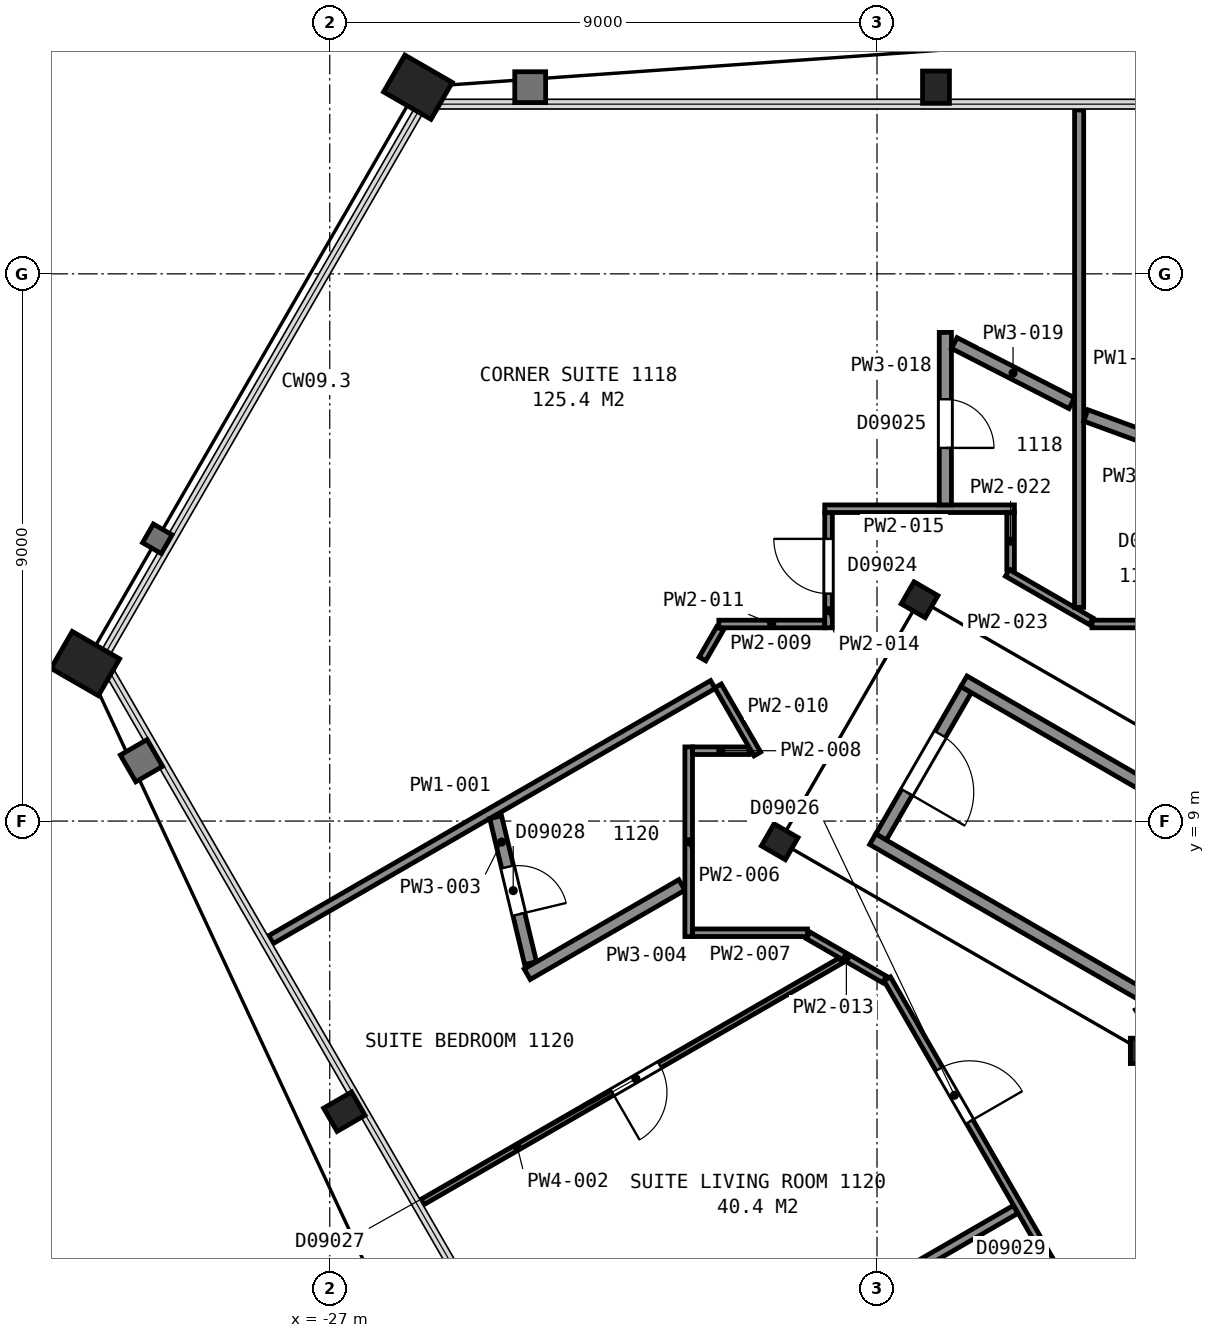
"""IFC4 building model, lengths in metres.
Left out: names, types, materials, properties, quantities, classifications, styles, units other than length and angle.
Written with IfcOpenShell. Run it as: python <this file> out.ifc"""

import sys

from ifc_helpers import new_model, si_unit, direction, frame, frame_2d, origin, origin_2d, place, context, subcontext, project, spatial, rectangle, hollow_rectangle, i_section, extrude, element, fill, save


model = new_model("IFC4")
c1 = context("Model", 3, precision=1e-05, world=origin(), true_north=direction((0.0, 1.0)))
c2 = subcontext(c1, "Body", "Model", "MODEL_VIEW")
j1 = project(units=[si_unit("LENGTHUNIT", "METRE"), si_unit("PLANEANGLEUNIT", "RADIAN")], contexts=[c1])
p1 = place(None, origin())
s1 = spatial("IfcSite", under=j1, at=p1, CompositionType="ELEMENT")
p2 = place(p1, origin())
s2 = spatial("IfcBuilding", under=s1, at=p2, CompositionType="ELEMENT")
p3 = place(p2, frame((0.0, 0.0, 54.8)))
s3 = spatial("IfcBuildingStorey", under=s2, at=p3, CompositionType="ELEMENT", Elevation=54.8)
p4 = place(p3, frame((-17.03, 21.07, 0.0), z_axis=(0.0, 0.0, 1.0), x_axis=(1.0, 0.0, 0.0)))
e1 = element("IfcColumn", 1, at=p4, inside=s3, PredefinedType="COLUMN", context=c2, shape_type="SweptSolid", body=[
    extrude(i_section(OverallWidth=0.442, OverallDepth=0.531, WebThickness=0.066, FlangeThickness=0.106, FilletRadius=0.015, at=origin_2d()), origin(), (0.0, 0.0, 1.0), 3.6),
])
for number, where, z_axis, x_axis in (
    (2, (-25.55, 21.07, 0.0), (0.0, 0.0, 1.0), (0.5, 0.866, 0.0)),
    (3, (-31.02, 11.59, 0.0), (0.0, 0.0, 1.0), (0.5, 0.866, 0.0)),
):
    element("IfcColumn", number, at=place(p3, frame(where, z_axis=z_axis, x_axis=x_axis)), inside=s3, PredefinedType="COLUMN", context=c2, shape_type="SweptSolid", body=[
        extrude(hollow_rectangle(XDim=0.7, YDim=0.9, WallThickness=0.065, at=origin_2d()), origin(), (0.0, 0.0, 1.0), 3.6),
    ])
p5 = place(p3, frame((-26.76, 4.22, 0.0), z_axis=(0.0, 0.0, 1.0), x_axis=(-0.5, 0.866025403784, 0.0)))
e4 = element("IfcColumn", 4, at=p5, inside=s3, PredefinedType="COLUMN", context=c2, shape_type="SweptSolid", body=[
    extrude(i_section(OverallWidth=0.442, OverallDepth=0.531, WebThickness=0.066, FlangeThickness=0.106, FilletRadius=0.015, at=origin_2d()), origin(), (0.0, 0.0, 1.0), 3.6),
])
for number, where, z_axis, x_axis in (
    (5, (-17.3, 12.64, 0.0), (0.0, 0.0, 1.0), (0.5, 0.866, 0.0)),
    (6, (-19.6, 8.66, 0.0), (0.0, 0.0, 1.0), (0.5, 0.866, 0.0)),
):
    element("IfcColumn", number, at=place(p3, frame(where, z_axis=z_axis, x_axis=x_axis)), inside=s3, PredefinedType="COLUMN", context=c2, shape_type="SweptSolid", body=[
        extrude(i_section(OverallWidth=0.419, OverallDepth=0.455, WebThickness=0.042, FlangeThickness=0.068, FilletRadius=0.015, at=origin_2d()), origin(), (0.0, 0.0, 1.0), 3.6),
    ])
p6 = place(p3, frame((-13.63, 5.22, 0.0), z_axis=(0.0, 0.0, 1.0), x_axis=(1.0, 0.0, 0.0)))
e7 = element("IfcColumn", 7, at=p6, inside=s3, PredefinedType="COLUMN", context=c2, shape_type="SweptSolid", body=[
    extrude(i_section(OverallWidth=0.406, OverallDepth=0.417, WebThickness=0.03, FlangeThickness=0.048, FilletRadius=0.015, at=origin_2d()), origin(), (0.0, 0.0, 1.0), 3.6),
])
p7 = place(p3, frame((-16.534, 11.162, 0.0), z_axis=(0.0, 0.0, 1.0), x_axis=(-0.49998411664, -0.866034573852, 0.0)))
e8 = element("IfcWall", 8, at=p7, inside=s3, PredefinedType="PARTITIONING", context=c2, shape_type="SweptSolid", body=[
    extrude(rectangle(XDim=2.8, YDim=0.2, at=frame_2d((1.4, 0.0))), origin(), (0.0, 0.0, 1.0), 3.35),
])
p8 = place(p7, frame((0.85, 0.0, 0.0)))
e9 = element("IfcOpeningElement", 9, at=p8, cuts=e8, PredefinedType="OPENING", context=c2, shape_type="SweptSolid", body=[
    extrude(rectangle(XDim=1.1, YDim=2.1, at=frame_2d((0.55, 1.05))), frame((0.0, 0.11, 0.0), z_axis=(0.0, -1.0, 0.0), x_axis=(1.0, 0.0, 0.0)), (0.0, 0.0, 1.0), 0.22),
])
for number, where, z_axis, x_axis in (
    (10, (-7.678, 2.701, 0.0), (0.0, 0.0, 1.0), (-0.866, 0.5, 0.0)),
    (11, (-6.178, 5.299, 0.0), (0.0, 0.0, 1.0), (-0.866, 0.5, 0.0)),
):
    element("IfcWall", number, at=place(p3, frame(where, z_axis=z_axis, x_axis=x_axis)), inside=s3, PredefinedType="PARTITIONING", context=c2, shape_type="SweptSolid", body=[
        extrude(rectangle(XDim=12.0, YDim=0.2, at=frame_2d((6.0, 0.0))), origin(), (0.0, 0.0, 1.0), 3.35),
    ])
p9 = place(p3, frame((-27.967, 7.05, 0.0), z_axis=(0.0, 0.0, 1.0), x_axis=(0.86603249375, 0.499987719618, 0.0)))
e12 = element("IfcWall", 12, at=p9, inside=s3, PredefinedType="PARTITIONING", context=c2, shape_type="SweptSolid", body=[
    extrude(rectangle(XDim=8.392, YDim=0.15, at=frame_2d((4.196, 0.0))), origin(), (0.0, 0.0, 1.0), 2.613),
])
p10 = place(p3, frame((-25.476, 2.735, 0.0), z_axis=(0.0, 0.0, 1.0), x_axis=(0.866077639848, 0.499909513568, 0.0)))
e13 = element("IfcWall", 13, at=p10, inside=s3, PredefinedType="PARTITIONING", context=c2, shape_type="SweptSolid", body=[
    extrude(rectangle(XDim=7.946, YDim=0.1, at=frame_2d((3.973, 0.0))), origin(), (0.0, 0.0, 1.0), 2.613),
])
p11 = place(p10, frame((3.604, 0.0, 0.0)))
e14 = element("IfcOpeningElement", 14, at=p11, cuts=e13, PredefinedType="OPENING", context=c2, shape_type="SweptSolid", body=[
    extrude(rectangle(XDim=0.9, YDim=2.1, at=frame_2d((0.45, 1.05))), frame((0.0, 0.06, 0.0), z_axis=(0.0, -1.0, 0.0), x_axis=(1.0, 0.0, 0.0)), (0.0, 0.0, 1.0), 0.12),
])
p12 = place(p3, frame((-24.272, 9.064, 0.0), z_axis=(0.0, 0.0, 1.0), x_axis=(0.232636237171, -0.972563818551, 0.0)))
e15 = element("IfcWall", 15, at=p12, inside=s3, PredefinedType="PARTITIONING", context=c2, shape_type="SweptSolid", body=[
    extrude(rectangle(XDim=2.469, YDim=0.2, at=frame_2d((1.235, 0.0))), origin(), (0.0, 0.0, 1.0), 2.613),
])
p13 = place(p12, frame((0.842, 0.0, 0.0)))
e16 = element("IfcOpeningElement", 16, at=p13, cuts=e15, PredefinedType="OPENING", context=c2, shape_type="SweptSolid", body=[
    extrude(rectangle(XDim=0.8, YDim=2.1, at=frame_2d((0.4, 1.05))), frame((0.0, 0.11, 0.0), z_axis=(0.0, -1.0, 0.0), x_axis=(1.0, 0.0, 0.0)), (0.0, 0.0, 1.0), 0.22),
])
p14 = place(p3, frame((-23.753, 6.481, 0.0), z_axis=(0.0, 0.0, 1.0), x_axis=(0.866070680301, 0.499921570572, 0.0)))
e17 = element("IfcWall", 17, at=p14, inside=s3, PredefinedType="PARTITIONING", context=c2, shape_type="SweptSolid", body=[
    extrude(rectangle(XDim=2.937, YDim=0.2, at=frame_2d((1.468, 0.0))), origin(), (0.0, 0.0, 1.0), 2.613),
])
p15 = place(p3, frame((-22.984, -1.581, 0.0), z_axis=(0.0, 0.0, 1.0), x_axis=(0.866040157966, 0.499974444137, 0.0)))
e18 = element("IfcWall", 18, at=p15, inside=s3, PredefinedType="PARTITIONING", context=c2, shape_type="SweptSolid", body=[
    extrude(rectangle(XDim=8.387, YDim=0.15, at=frame_2d((4.193, 0.0))), origin(), (0.0, 0.0, 1.0), 2.613),
])
p16 = place(p3, frame((-21.097, 7.101, 0.0), z_axis=(0.0, 0.0, 1.0), x_axis=(0.0, 1.0, 0.0)))
e19 = element("IfcWall", 19, at=p16, inside=s3, PredefinedType="PARTITIONING", context=c2, shape_type="SweptSolid", body=[
    extrude(rectangle(XDim=3.119, YDim=0.125, at=frame_2d((1.56, 0.0))), origin(), (0.0, 0.0, 1.0), 2.613),
])
p17 = place(p3, frame((-21.032, 7.163, 0.0), z_axis=(0.0, 0.0, 1.0), x_axis=(1.0, 0.0, 0.0)))
e20 = element("IfcWall", 20, at=p17, inside=s3, PredefinedType="PARTITIONING", context=c2, shape_type="SweptSolid", body=[
    extrude(rectangle(XDim=1.888, YDim=0.125, at=frame_2d((0.944, 0.0))), origin(), (0.0, 0.0, 1.0), 2.613),
])
p18 = place(p3, frame((-21.032, 10.157, 0.0), z_axis=(0.0, 0.0, 1.0), x_axis=(1.0, 0.0, 0.0)))
e21 = element("IfcWall", 21, at=p18, inside=s3, PredefinedType="PARTITIONING", context=c2, shape_type="SweptSolid", body=[
    extrude(rectangle(XDim=0.928, YDim=0.125, at=frame_2d((0.464, 0.0))), origin(), (0.0, 0.0, 1.0), 2.613),
])
p19 = place(p3, frame((-20.871, 11.667, 0.0), z_axis=(0.0, 0.0, 1.0), x_axis=(0.500769941337, 0.865580421367, 0.0)))
e22 = element("IfcWall", 22, at=p19, inside=s3, PredefinedType="PARTITIONING", context=c2, shape_type="SweptSolid", body=[
    extrude(rectangle(XDim=0.578, YDim=0.125, at=frame_2d((0.289, 0.0))), origin(), (0.0, 0.0, 1.0), 2.613),
])
p20 = place(p3, frame((-20.615, 11.223, 0.0), z_axis=(0.0, 0.0, 1.0), x_axis=(0.500076370288, -0.865981306888, 0.0)))
e23 = element("IfcWall", 23, at=p20, inside=s3, PredefinedType="PARTITIONING", context=c2, shape_type="SweptSolid", body=[
    extrude(rectangle(XDim=1.294, YDim=0.125, at=frame_2d((0.647, 0.0))), origin(), (0.0, 0.0, 1.0), 2.613),
])
p21 = place(p3, frame((-20.602, 12.241, 0.0), z_axis=(0.0, 0.0, 1.0), x_axis=(1.0, 0.0, 0.0)))
e24 = element("IfcWall", 24, at=p21, inside=s3, PredefinedType="PARTITIONING", context=c2, shape_type="SweptSolid", body=[
    extrude(rectangle(XDim=1.74, YDim=0.125, at=frame_2d((0.87, 0.0))), origin(), (0.0, 0.0, 1.0), 2.613),
])
p22 = place(p3, frame((-19.132, 7.121, 0.0), z_axis=(0.0, 0.0, 1.0), x_axis=(0.865894215669, -0.500227155672, 0.0)))
e25 = element("IfcWall", 25, at=p22, inside=s3, PredefinedType="PARTITIONING", context=c2, shape_type="SweptSolid", body=[
    extrude(rectangle(XDim=1.451, YDim=0.125, at=frame_2d((0.726, 0.0))), origin(), (0.0, 0.0, 1.0), 2.613),
])
p23 = place(p3, frame((-18.797, 12.178, 0.0), z_axis=(0.0, 0.0, 1.0), x_axis=(0.0, 1.0, 0.0)))
e26 = element("IfcWall", 26, at=p23, inside=s3, PredefinedType="PARTITIONING", context=c2, shape_type="SweptSolid", body=[
    extrude(rectangle(XDim=1.894, YDim=0.125, at=frame_2d((0.947, 0.0))), origin(), (0.0, 0.0, 1.0), 2.613),
])
p24 = place(p23, frame((0.562, 0.0, 0.0)))
e27 = element("IfcOpeningElement", 27, at=p24, cuts=e26, PredefinedType="OPENING", context=c2, shape_type="SweptSolid", body=[
    extrude(rectangle(XDim=0.9, YDim=2.1, at=frame_2d((0.45, 1.05))), frame((0.0, 0.073, 0.0), z_axis=(0.0, -1.0, 0.0), x_axis=(1.0, 0.0, 0.0)), (0.0, 0.0, 1.0), 0.145),
])
p25 = place(p3, frame((-18.86, 14.137, 0.0), z_axis=(0.0, 0.0, 1.0), x_axis=(1.0, 0.0, 0.0)))
e28 = element("IfcWall", 28, at=p25, inside=s3, PredefinedType="PARTITIONING", context=c2, shape_type="SweptSolid", body=[
    extrude(rectangle(XDim=3.119, YDim=0.125, at=frame_2d((1.56, 0.0))), origin(), (0.0, 0.0, 1.0), 2.613),
])
p26 = place(p3, frame((-3.766, -17.959, 0.0), z_axis=(0.0, 0.0, 1.0), x_axis=(-0.500002884005, 0.866023738697, 0.0)))
e29 = element("IfcWall", 29, at=p26, inside=s3, PredefinedType="PARTITIONING", context=c2, shape_type="SweptSolid", body=[
    extrude(rectangle(XDim=28.135, YDim=0.125, at=frame_2d((14.067, 0.0))), origin(), (0.0, 0.0, 1.0), 2.613),
])
p27 = place(p26, frame((25.422, 0.0, 0.0)))
e30 = element("IfcOpeningElement", 30, at=p27, cuts=e29, PredefinedType="OPENING", context=c2, shape_type="SweptSolid", body=[
    extrude(rectangle(XDim=1.0, YDim=2.1, at=frame_2d((0.5, 1.05))), frame((0.0, 0.073, 0.0), z_axis=(0.0, -1.0, 0.0), x_axis=(1.0, 0.0, 0.0)), (0.0, 0.0, 1.0), 0.145),
])
p28 = place(p26, frame((21.693, 0.0, 0.0)))
e31 = element("IfcOpeningElement", 31, at=p28, cuts=e29, PredefinedType="OPENING", context=c2, shape_type="SweptSolid", body=[
    extrude(rectangle(XDim=0.9, YDim=2.1, at=frame_2d((0.45, 1.05))), frame((0.0, 0.073, 0.0), z_axis=(0.0, -1.0, 0.0), x_axis=(1.0, 0.0, 0.0)), (0.0, 0.0, 1.0), 0.145),
])
p29 = place(p26, frame((14.438, 0.0, 0.0)))
e32 = element("IfcOpeningElement", 32, at=p29, cuts=e29, PredefinedType="OPENING", context=c2, shape_type="SweptSolid", body=[
    extrude(rectangle(XDim=0.9, YDim=2.1, at=frame_2d((0.45, 1.05))), frame((0.0, 0.073, 0.0), z_axis=(0.0, -1.0, 0.0), x_axis=(1.0, 0.0, 0.0)), (0.0, 0.0, 1.0), 0.145),
])
p30 = place(p26, frame((11.712, 0.0, 0.0)))
e33 = element("IfcOpeningElement", 33, at=p30, cuts=e29, PredefinedType="OPENING", context=c2, shape_type="SweptSolid", body=[
    extrude(rectangle(XDim=0.9, YDim=2.1, at=frame_2d((0.45, 1.05))), frame((0.0, 0.073, 0.0), z_axis=(0.0, -1.0, 0.0), x_axis=(1.0, 0.0, 0.0)), (0.0, 0.0, 1.0), 0.145),
])
p31 = place(p26, frame((4.787, 0.0, 0.0)))
e34 = element("IfcOpeningElement", 34, at=p31, cuts=e29, PredefinedType="OPENING", context=c2, shape_type="SweptSolid", body=[
    extrude(rectangle(XDim=0.9, YDim=2.1, at=frame_2d((0.45, 1.05))), frame((0.0, 0.073, 0.0), z_axis=(0.0, -1.0, 0.0), x_axis=(1.0, 0.0, 0.0)), (0.0, 0.0, 1.0), 0.145),
])
p32 = place(p26, frame((1.762, 0.0, 0.0)))
e35 = element("IfcOpeningElement", 35, at=p32, cuts=e29, PredefinedType="OPENING", context=c2, shape_type="SweptSolid", body=[
    extrude(rectangle(XDim=0.9, YDim=2.1, at=frame_2d((0.45, 1.05))), frame((0.0, 0.073, 0.0), z_axis=(0.0, -1.0, 0.0), x_axis=(1.0, 0.0, 0.0)), (0.0, 0.0, 1.0), 0.145),
])
p33 = place(p3, frame((-16.876, 17.037, 0.0), z_axis=(0.0, 0.0, 1.0), x_axis=(0.0, -1.0, 0.0)))
e36 = element("IfcWall", 36, at=p33, inside=s3, PredefinedType="PARTITIONING", context=c2, shape_type="SweptSolid", body=[
    extrude(rectangle(XDim=2.838, YDim=0.2, at=frame_2d((1.419, 0.0))), origin(), (0.0, 0.0, 1.0), 2.613),
])
p34 = place(p33, frame((1.1, 0.0, 0.0)))
e37 = element("IfcOpeningElement", 37, at=p34, cuts=e36, PredefinedType="OPENING", context=c2, shape_type="SweptSolid", body=[
    extrude(rectangle(XDim=0.8, YDim=2.1, at=frame_2d((0.4, 1.05))), frame((0.0, 0.11, 0.0), z_axis=(0.0, -1.0, 0.0), x_axis=(1.0, 0.0, 0.0)), (0.0, 0.0, 1.0), 0.22),
])
p35 = place(p3, frame((-16.729, 16.862, 0.0), z_axis=(0.0, 0.0, 1.0), x_axis=(0.890181338078, -0.455606392995, 0.0)))
e38 = element("IfcWall", 38, at=p35, inside=s3, PredefinedType="PARTITIONING", context=c2, shape_type="SweptSolid", body=[
    extrude(rectangle(XDim=2.171, YDim=0.2, at=frame_2d((1.085, 0.0))), origin(), (0.0, 0.0, 1.0), 2.613),
])
p36 = place(p3, frame((-15.803, 13.135, 0.0), z_axis=(0.0, 0.0, 1.0), x_axis=(0.0, 1.0, 0.0)))
e39 = element("IfcWall", 39, at=p36, inside=s3, PredefinedType="PARTITIONING", context=c2, shape_type="SweptSolid", body=[
    extrude(rectangle(XDim=0.937, YDim=0.125, at=frame_2d((0.469, 0.0))), origin(), (0.0, 0.0, 1.0), 2.613),
])
p37 = place(p3, frame((-15.857, 13.081, 0.0), z_axis=(0.0, 0.0, 1.0), x_axis=(0.865974057503, -0.500088923824, 0.0)))
e40 = element("IfcWall", 40, at=p37, inside=s3, PredefinedType="PARTITIONING", context=c2, shape_type="SweptSolid", body=[
    extrude(rectangle(XDim=1.595, YDim=0.125, at=frame_2d((0.798, 0.0))), origin(), (0.0, 0.0, 1.0), 2.613),
])
p38 = place(p3, frame((-14.676, 12.514, 0.0), z_axis=(0.0, 0.0, 1.0), x_axis=(0.0, 1.0, 0.0)))
e41 = element("IfcWall", 41, at=p38, inside=s3, PredefinedType="PARTITIONING", context=c2, shape_type="SweptSolid", body=[
    extrude(rectangle(XDim=8.181, YDim=0.15, at=frame_2d((4.09, 0.0))), origin(), (0.0, 0.0, 1.0), 2.613),
])
p39 = place(p3, frame((-14.567, 15.671, 0.0), z_axis=(0.0, 0.0, 1.0), x_axis=(0.938894816734, -0.344204188105, 0.0)))
e42 = element("IfcWall", 42, at=p39, inside=s3, PredefinedType="PARTITIONING", context=c2, shape_type="SweptSolid", body=[
    extrude(rectangle(XDim=1.99, YDim=0.2, at=frame_2d((0.995, 0.0))), origin(), (0.0, 0.0, 1.0), 2.613),
])
p40 = place(p3, frame((-14.465, 12.241, 0.0), z_axis=(0.0, 0.0, 1.0), x_axis=(1.0, 0.0, 0.0)))
e43 = element("IfcWall", 43, at=p40, inside=s3, PredefinedType="PARTITIONING", context=c2, shape_type="SweptSolid", body=[
    extrude(rectangle(XDim=28.929, YDim=0.125, at=frame_2d((14.465, 0.0))), origin(), (0.0, 0.0, 1.0), 2.613),
])
p41 = place(p40, frame((25.252, 0.0, 0.0)))
e44 = element("IfcOpeningElement", 44, at=p41, cuts=e43, PredefinedType="OPENING", context=c2, shape_type="SweptSolid", body=[
    extrude(rectangle(XDim=0.9, YDim=2.1, at=frame_2d((0.45, 1.05))), frame((0.0, 0.073, 0.0), z_axis=(0.0, -1.0, 0.0), x_axis=(1.0, 0.0, 0.0)), (0.0, 0.0, 1.0), 0.145),
])
p42 = place(p40, frame((22.564, 0.0, 0.0)))
e45 = element("IfcOpeningElement", 45, at=p42, cuts=e43, PredefinedType="OPENING", context=c2, shape_type="SweptSolid", body=[
    extrude(rectangle(XDim=0.9, YDim=2.1, at=frame_2d((0.45, 1.05))), frame((0.0, 0.073, 0.0), z_axis=(0.0, -1.0, 0.0), x_axis=(1.0, 0.0, 0.0)), (0.0, 0.0, 1.0), 0.145),
])
p43 = place(p40, frame((15.302, 0.0, 0.0)))
e46 = element("IfcOpeningElement", 46, at=p43, cuts=e43, PredefinedType="OPENING", context=c2, shape_type="SweptSolid", body=[
    extrude(rectangle(XDim=0.9, YDim=2.1, at=frame_2d((0.45, 1.05))), frame((0.0, 0.073, 0.0), z_axis=(0.0, -1.0, 0.0), x_axis=(1.0, 0.0, 0.0)), (0.0, 0.0, 1.0), 0.145),
])
p44 = place(p40, frame((12.365, 0.0, 0.0)))
e47 = element("IfcOpeningElement", 47, at=p44, cuts=e43, PredefinedType="OPENING", context=c2, shape_type="SweptSolid", body=[
    extrude(rectangle(XDim=0.9, YDim=2.1, at=frame_2d((0.45, 1.05))), frame((0.0, 0.073, 0.0), z_axis=(0.0, -1.0, 0.0), x_axis=(1.0, 0.0, 0.0)), (0.0, 0.0, 1.0), 0.145),
])
p45 = place(p40, frame((5.477, 0.0, 0.0)))
e48 = element("IfcOpeningElement", 48, at=p45, cuts=e43, PredefinedType="OPENING", context=c2, shape_type="SweptSolid", body=[
    extrude(rectangle(XDim=0.9, YDim=2.1, at=frame_2d((0.45, 1.05))), frame((0.0, 0.073, 0.0), z_axis=(0.0, -1.0, 0.0), x_axis=(1.0, 0.0, 0.0)), (0.0, 0.0, 1.0), 0.145),
])
p46 = place(p40, frame((2.789, 0.0, 0.0)))
e49 = element("IfcOpeningElement", 49, at=p46, cuts=e43, PredefinedType="OPENING", context=c2, shape_type="SweptSolid", body=[
    extrude(rectangle(XDim=0.9, YDim=2.1, at=frame_2d((0.45, 1.05))), frame((0.0, 0.073, 0.0), z_axis=(0.0, -1.0, 0.0), x_axis=(1.0, 0.0, 0.0)), (0.0, 0.0, 1.0), 0.145),
])
p47 = place(p8, origin())
e50 = element("IfcDoor", 50, at=p47, inside=s3, OperationType="SINGLE_SWING_RIGHT", PredefinedType="DOOR", context=c2, shape_type="SweptSolid", body=[
    extrude(rectangle(XDim=1.1, YDim=2.1, at=frame_2d((0.55, 1.05))), frame((0.0, 0.025, 0.0), z_axis=(0.0, -1.0, 0.0), x_axis=(1.0, 0.0, 0.0)), (0.0, 0.0, 1.0), 0.05),
])
fill(e9, e50)
p48 = place(p11, origin())
e51 = element("IfcDoor", 51, at=p48, inside=s3, OperationType="SINGLE_SWING_LEFT", PredefinedType="DOOR", context=c2, shape_type="SweptSolid", body=[
    extrude(rectangle(XDim=0.9, YDim=2.1, at=frame_2d((0.45, 1.05))), frame((0.0, 0.025, 0.0), z_axis=(0.0, -1.0, 0.0), x_axis=(1.0, 0.0, 0.0)), (0.0, 0.0, 1.0), 0.05),
])
fill(e14, e51)
p49 = place(p13, origin())
e52 = element("IfcDoor", 52, at=p49, inside=s3, OperationType="SINGLE_SWING_RIGHT", PredefinedType="DOOR", context=c2, shape_type="SweptSolid", body=[
    extrude(rectangle(XDim=0.8, YDim=2.1, at=frame_2d((0.4, 1.05))), frame((0.0, 0.025, 0.0), z_axis=(0.0, -1.0, 0.0), x_axis=(1.0, 0.0, 0.0)), (0.0, 0.0, 1.0), 0.05),
])
fill(e16, e52)
p50 = place(p24, origin())
e53 = element("IfcDoor", 53, at=p50, inside=s3, OperationType="SINGLE_SWING_RIGHT", PredefinedType="DOOR", context=c2, shape_type="SweptSolid", body=[
    extrude(rectangle(XDim=0.9, YDim=2.1, at=frame_2d((0.45, 1.05))), frame((0.0, 0.025, 0.0), z_axis=(0.0, -1.0, 0.0), x_axis=(1.0, 0.0, 0.0)), (0.0, 0.0, 1.0), 0.05),
])
fill(e27, e53)
p51 = place(p27, origin())
e54 = element("IfcDoor", 54, at=p51, inside=s3, OperationType="SINGLE_SWING_LEFT", PredefinedType="DOOR", context=c2, shape_type="SweptSolid", body=[
    extrude(rectangle(XDim=1.0, YDim=2.1, at=frame_2d((0.5, 1.05))), frame((0.0, 0.025, 0.0), z_axis=(0.0, -1.0, 0.0), x_axis=(1.0, 0.0, 0.0)), (0.0, 0.0, 1.0), 0.05),
])
fill(e30, e54)
p52 = place(p34, origin())
e55 = element("IfcDoor", 55, at=p52, inside=s3, OperationType="SINGLE_SWING_RIGHT", PredefinedType="DOOR", context=c2, shape_type="SweptSolid", body=[
    extrude(rectangle(XDim=0.8, YDim=2.1, at=frame_2d((0.4, 1.05))), frame((0.0, 0.025, 0.0), z_axis=(0.0, -1.0, 0.0), x_axis=(1.0, 0.0, 0.0)), (0.0, 0.0, 1.0), 0.05),
])
fill(e37, e55)
save(model, sys.argv[1])
